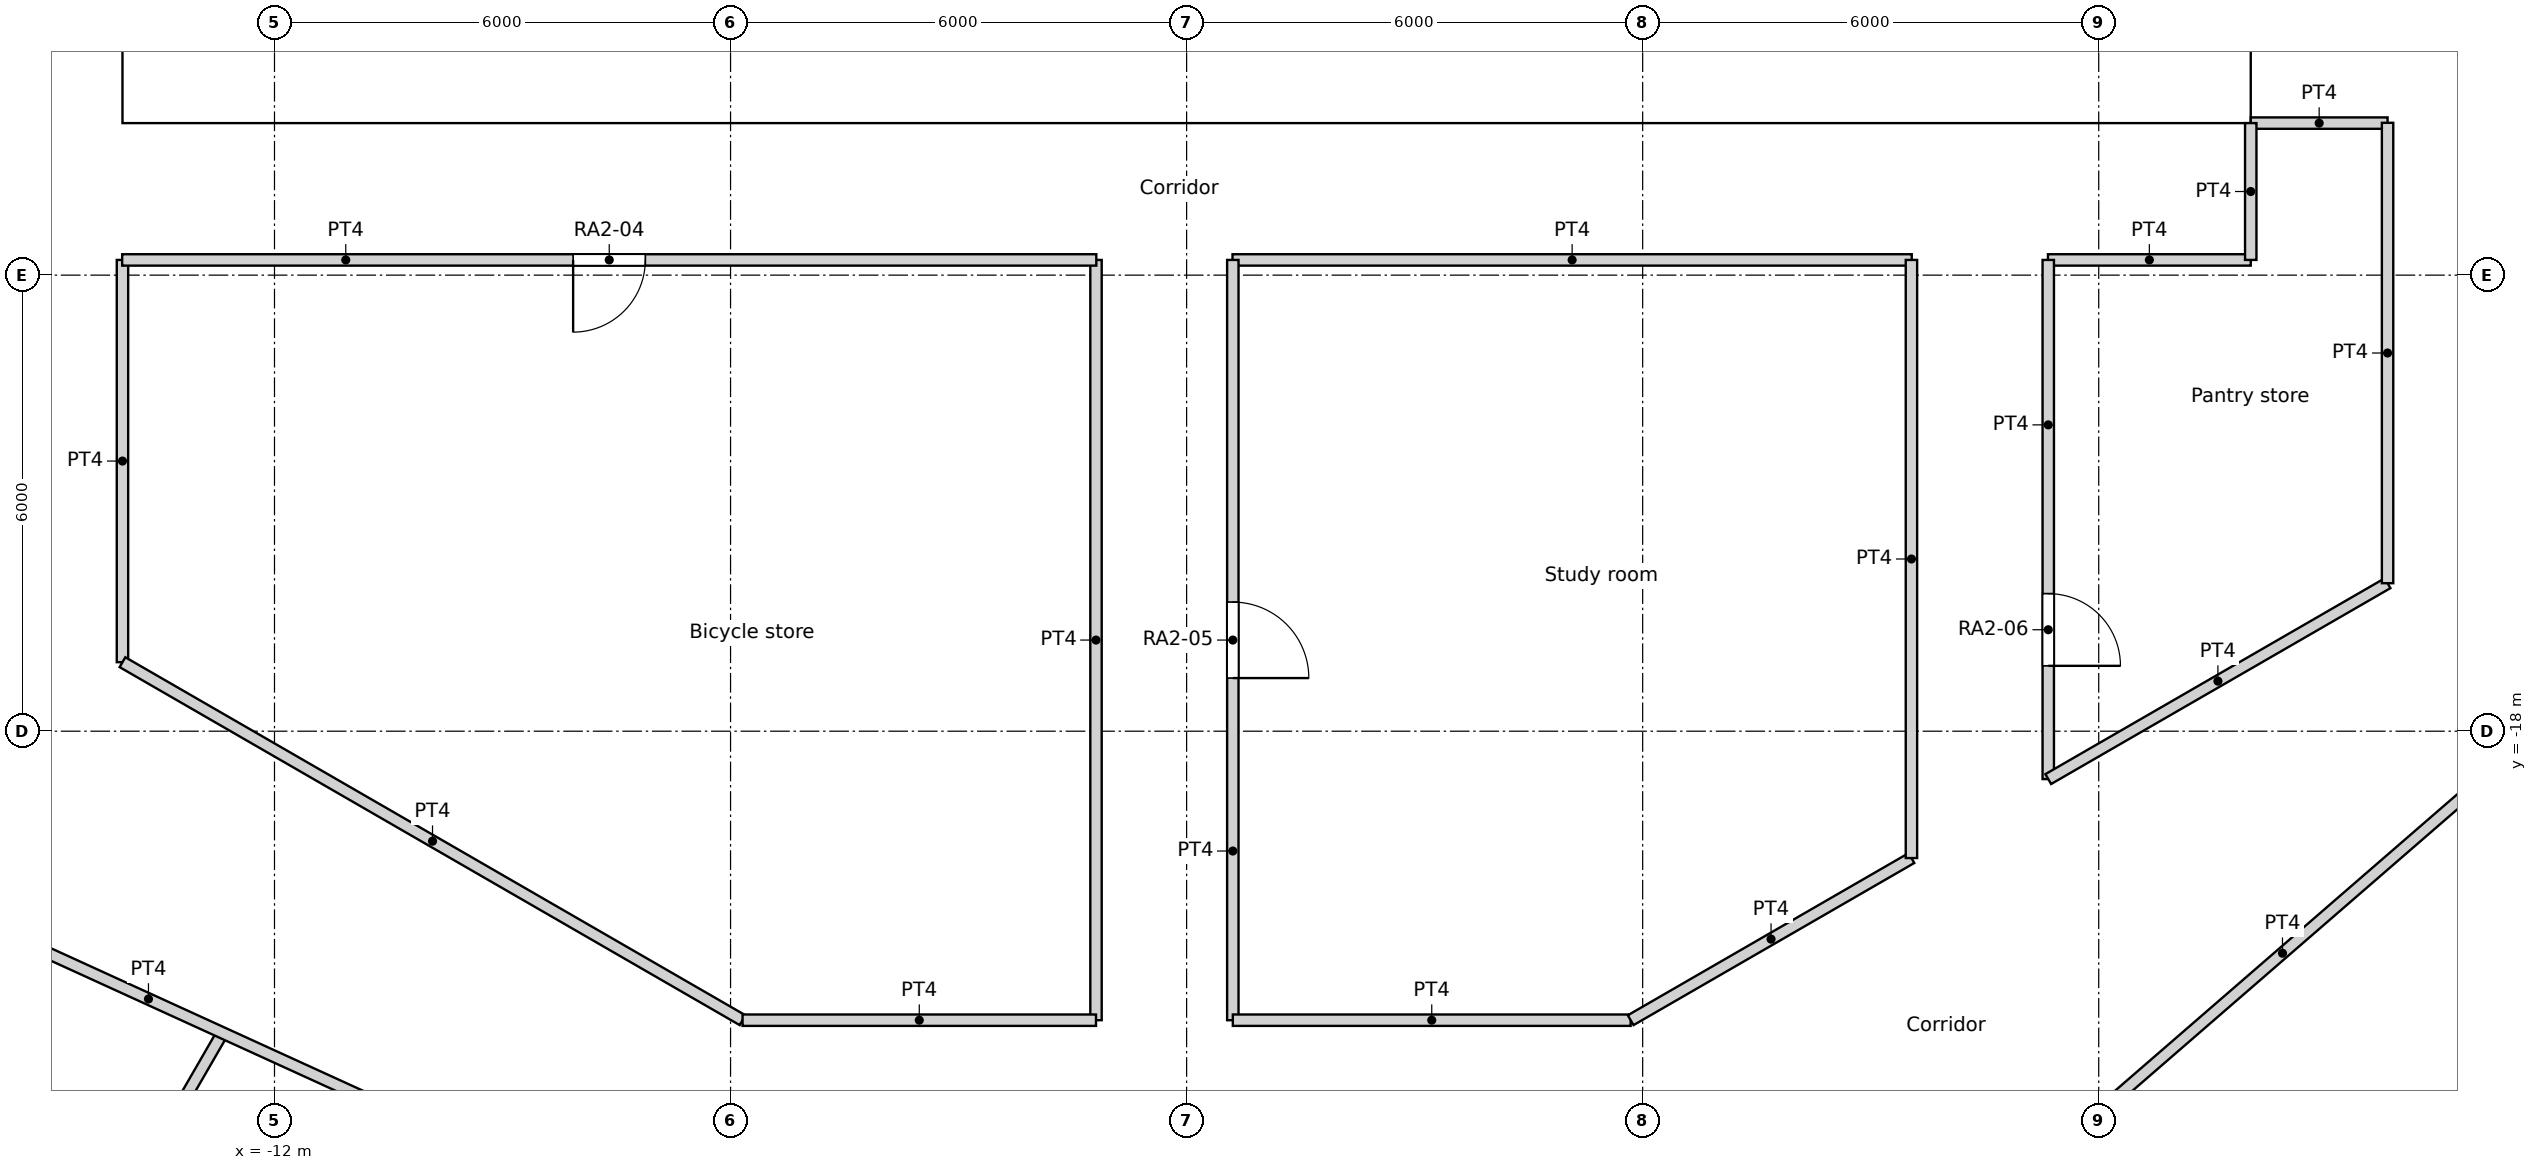
"""IFC4 building model, lengths in metres.
Left out: names, types, materials, properties, quantities, classifications, styles, units other than length and angle.
Written with IfcOpenShell. Run it as: python <this file> out.ifc"""

import sys

from ifc_helpers import new_model, si_unit, direction, frame, frame_2d, origin, origin_2d, place, context, subcontext, project, spatial, rectangle, circle, extrude, element, fill, save


model = new_model("IFC4")
c1 = context("Model", 3, precision=1e-05, world=origin(), true_north=direction((0.0, 1.0)))
c2 = subcontext(c1, "Body", "Model", "MODEL_VIEW")
j1 = project(units=[si_unit("LENGTHUNIT", "METRE"), si_unit("PLANEANGLEUNIT", "RADIAN")], contexts=[c1])
p1 = place(None, origin())
s1 = spatial("IfcSite", under=j1, at=p1, CompositionType="ELEMENT")
p2 = place(p1, origin())
s2 = spatial("IfcBuilding", under=s1, at=p2, CompositionType="ELEMENT")
p3 = place(p2, frame((0.0, 0.0, 39.0)))
s3 = spatial("IfcBuildingStorey", under=s2, at=p3, CompositionType="ELEMENT", Elevation=39.0)
for number, where, z_axis, x_axis in (
    (1, (-12.274, -21.259, 0.0), (0.0, 0.0, 1.0), (1.0, 0.0, 0.0)),
    (2, (9.723, -22.54, 0.0), (0.0, 0.0, 1.0), (1.0, 0.0, 0.0)),
    (3, (14.659, -19.69, 0.0), (0.0, 0.0, 1.0), (1.0, 0.0, 0.0)),
):
    element("IfcColumn", number, at=place(p3, frame(where, z_axis=z_axis, x_axis=x_axis)), inside=s3, PredefinedType="COLUMN", context=c2, shape_type="SweptSolid", body=[
        extrude(circle(Radius=0.75, at=origin_2d()), origin(), (0.0, 0.0, 1.0), 3.6),
    ])
for number, where, z_axis, x_axis in (
    (4, (-13.798, -12.802, 0.0), (0.0, 0.0, 1.0), (1.0, 0.0, 0.0)),
    (5, (-9.411, -16.301, 0.0), (0.0, 0.0, 1.0), (1.0, 0.0, 0.0)),
    (6, (-4.188, -18.35, 0.0), (0.0, 0.0, 1.0), (1.0, 0.0, 0.0)),
    (7, (1.406, -18.77, 0.0), (0.0, 0.0, 1.0), (1.0, 0.0, 0.0)),
    (8, (6.876, -17.521, 0.0), (0.0, 0.0, 1.0), (1.0, 0.0, 0.0)),
    (9, (11.735, -14.716, 0.0), (0.0, 0.0, 1.0), (1.0, 0.0, 0.0)),
    (10, (15.552, -10.603, 0.0), (0.0, 0.0, 1.0), (1.0, 0.0, 0.0)),
):
    element("IfcColumn", number, at=place(p3, frame(where, z_axis=z_axis, x_axis=x_axis)), inside=s3, PredefinedType="COLUMN", context=c2, shape_type="SweptSolid", body=[
        extrude(circle(Radius=0.8, at=origin_2d()), origin(), (0.0, 0.0, 1.0), 3.6),
    ])
p4 = place(p3, frame((-14.0, -9.4, 0.0), z_axis=(0.0, 0.0, 1.0), x_axis=(1.0, 0.0, 0.0)))
e11 = element("IfcWall", 11, at=p4, inside=s3, PredefinedType="SOLIDWALL", context=c2, shape_type="SweptSolid", body=[
    extrude(rectangle(XDim=28.0, YDim=1.2, at=frame_2d((14.0, 0.0))), origin(), (0.0, 0.0, 1.0), 3.6),
])
p5 = place(p4, frame((14.9, 0.0, 0.0)))
e12 = element("IfcOpeningElement", 12, at=p5, cuts=e11, PredefinedType="OPENING", context=c2, shape_type="SweptSolid", body=[
    extrude(rectangle(XDim=1.0, YDim=2.1, at=frame_2d((0.5, 1.05))), frame((0.0, 0.6, 0.0), z_axis=(0.0, -1.0, 0.0), x_axis=(1.0, 0.0, 0.0)), (0.0, 0.0, 1.0), 1.2),
])
p6 = place(p4, frame((9.8, 0.0, 0.0)))
e13 = element("IfcOpeningElement", 13, at=p6, cuts=e11, PredefinedType="OPENING", context=c2, shape_type="SweptSolid", body=[
    extrude(rectangle(XDim=1.8, YDim=2.1, at=frame_2d((0.9, 1.05))), frame((0.0, 0.6, 0.0), z_axis=(0.0, -1.0, 0.0), x_axis=(1.0, 0.0, 0.0)), (0.0, 0.0, 1.0), 1.2),
])
p7 = place(p4, frame((16.4, 0.0, 0.0)))
e14 = element("IfcOpeningElement", 14, at=p7, cuts=e11, PredefinedType="OPENING", context=c2, shape_type="SweptSolid", body=[
    extrude(rectangle(XDim=1.8, YDim=2.1, at=frame_2d((0.9, 1.05))), frame((0.0, 0.6, 0.0), z_axis=(0.0, -1.0, 0.0), x_axis=(1.0, 0.0, 0.0)), (0.0, 0.0, 1.0), 1.2),
])
p8 = place(p3, frame((-14.004, -11.8, 0.0), z_axis=(0.0, 0.0, 1.0), x_axis=(1.0, 0.0, 0.0)))
e15 = element("IfcWall", 15, at=p8, inside=s3, PredefinedType="PARTITIONING", context=c2, shape_type="SweptSolid", body=[
    extrude(rectangle(XDim=12.816, YDim=0.15, at=frame_2d((6.408, 0.0))), origin(), (0.0, 0.0, 1.0), 3.15),
])
p9 = place(p8, frame((5.933, 0.0, 0.0)))
e16 = element("IfcOpeningElement", 16, at=p9, cuts=e15, PredefinedType="OPENING", context=c2, shape_type="SweptSolid", body=[
    extrude(rectangle(XDim=0.95, YDim=2.1, at=frame_2d((0.475, 1.05))), frame((0.0, 0.075, 0.0), z_axis=(0.0, -1.0, 0.0), x_axis=(1.0, 0.0, 0.0)), (0.0, 0.0, 1.0), 0.15),
])
p10 = place(p3, frame((0.604, -11.8, 0.0), z_axis=(0.0, 0.0, 1.0), x_axis=(1.0, 0.0, 0.0)))
e17 = element("IfcWall", 17, at=p10, inside=s3, PredefinedType="PARTITIONING", context=c2, shape_type="SweptSolid", body=[
    extrude(rectangle(XDim=8.936, YDim=0.15, at=frame_2d((4.468, 0.0))), origin(), (0.0, 0.0, 1.0), 3.15),
])
p11 = place(p3, frame((14.0, -11.8, 0.0), z_axis=(0.0, 0.0, 1.0), x_axis=(0.0, 1.0, 0.0)))
e18 = element("IfcWall", 18, at=p11, inside=s3, PredefinedType="PARTITIONING", context=c2, shape_type="SweptSolid", body=[
    extrude(rectangle(XDim=1.8, YDim=0.15, at=frame_2d((0.9, 0.0))), origin(), (0.0, 0.0, 1.0), 3.15),
])
p12 = place(p3, frame((11.332, -11.8, 0.0), z_axis=(0.0, 0.0, 1.0), x_axis=(1.0, 0.0, 0.0)))
e19 = element("IfcWall", 19, at=p12, inside=s3, PredefinedType="PARTITIONING", context=c2, shape_type="SweptSolid", body=[
    extrude(rectangle(XDim=2.668, YDim=0.15, at=frame_2d((1.334, 0.0))), origin(), (0.0, 0.0, 1.0), 3.15),
])
p13 = place(p3, frame((14.0, -10.0, 0.0), z_axis=(0.0, 0.0, 1.0), x_axis=(1.0, 0.0, 0.0)))
e20 = element("IfcWall", 20, at=p13, inside=s3, PredefinedType="PARTITIONING", context=c2, shape_type="SweptSolid", body=[
    extrude(rectangle(XDim=1.8, YDim=0.15, at=frame_2d((0.9, 0.0))), origin(), (0.0, 0.0, 1.0), 3.15),
])
p14 = place(p3, frame((15.8, -16.053, 0.0), z_axis=(0.0, 0.0, 1.0), x_axis=(0.0, 1.0, 0.0)))
e21 = element("IfcWall", 21, at=p14, inside=s3, PredefinedType="PARTITIONING", context=c2, shape_type="SweptSolid", body=[
    extrude(rectangle(XDim=6.057, YDim=0.15, at=frame_2d((3.028, 0.0))), origin(), (0.0, 0.0, 1.0), 3.15),
])
p15 = place(p3, frame((-14.0, -17.092, 0.0), z_axis=(0.0, 0.0, 1.0), x_axis=(0.0, 1.0, 0.0)))
e22 = element("IfcWall", 22, at=p15, inside=s3, PredefinedType="PARTITIONING", context=c2, shape_type="SweptSolid", body=[
    extrude(rectangle(XDim=5.292, YDim=0.15, at=frame_2d((2.646, 0.0))), origin(), (0.0, 0.0, 1.0), 3.15),
])
p16 = place(p3, frame((-14.0, -17.092, 0.0), z_axis=(0.0, 0.0, 1.0), x_axis=(0.86602719091, -0.499996904595, 0.0)))
e23 = element("IfcWall", 23, at=p16, inside=s3, PredefinedType="PARTITIONING", context=c2, shape_type="SweptSolid", body=[
    extrude(rectangle(XDim=9.42, YDim=0.15, at=frame_2d((4.71, 0.0))), origin(), (0.0, 0.0, 1.0), 3.15),
])
p17 = place(p3, frame((-5.842, -21.802, 0.0), z_axis=(0.0, 0.0, 1.0), x_axis=(1.0, 0.0, 0.0)))
e24 = element("IfcWall", 24, at=p17, inside=s3, PredefinedType="PARTITIONING", context=c2, shape_type="SweptSolid", body=[
    extrude(rectangle(XDim=4.65, YDim=0.15, at=frame_2d((2.325, 0.0))), origin(), (0.0, 0.0, 1.0), 3.15),
])
p18 = place(p3, frame((-1.192, -21.802, 0.0), z_axis=(0.0, 0.0, 1.0), x_axis=(0.0, 1.0, 0.0)))
e25 = element("IfcWall", 25, at=p18, inside=s3, PredefinedType="PARTITIONING", context=c2, shape_type="SweptSolid", body=[
    extrude(rectangle(XDim=10.002, YDim=0.15, at=frame_2d((5.001, 0.0))), origin(), (0.0, 0.0, 1.0), 3.15),
])
p19 = place(p3, frame((0.608, -21.802, 0.0), z_axis=(0.0, 0.0, 1.0), x_axis=(0.0, 1.0, 0.0)))
e26 = element("IfcWall", 26, at=p19, inside=s3, PredefinedType="PARTITIONING", context=c2, shape_type="SweptSolid", body=[
    extrude(rectangle(XDim=10.002, YDim=0.15, at=frame_2d((5.001, 0.0))), origin(), (0.0, 0.0, 1.0), 3.15),
])
p20 = place(p19, frame((4.501, 0.0, 0.0)))
e27 = element("IfcOpeningElement", 27, at=p20, cuts=e26, PredefinedType="OPENING", context=c2, shape_type="SweptSolid", body=[
    extrude(rectangle(XDim=1.0, YDim=2.04, at=frame_2d((0.5, 1.02))), frame((0.0, 0.075, 0.0), z_axis=(0.0, -1.0, 0.0), x_axis=(1.0, 0.0, 0.0)), (0.0, 0.0, 1.0), 0.15),
])
p21 = place(p3, frame((0.608, -21.802, 0.0), z_axis=(0.0, 0.0, 1.0), x_axis=(1.0, 0.0, 0.0)))
e28 = element("IfcWall", 28, at=p21, inside=s3, PredefinedType="PARTITIONING", context=c2, shape_type="SweptSolid", body=[
    extrude(rectangle(XDim=5.234, YDim=0.15, at=frame_2d((2.617, 0.0))), origin(), (0.0, 0.0, 1.0), 3.15),
])
p22 = place(p3, frame((5.842, -21.802, 0.0), z_axis=(0.0, 0.0, 1.0), x_axis=(0.865983505205, 0.500072563448, 0.0)))
e29 = element("IfcWall", 29, at=p22, inside=s3, PredefinedType="PARTITIONING", context=c2, shape_type="SweptSolid", body=[
    extrude(rectangle(XDim=4.265, YDim=0.15, at=frame_2d((2.133, 0.0))), origin(), (0.0, 0.0, 1.0), 3.15),
])
p23 = place(p3, frame((9.536, -19.669, 0.0), z_axis=(0.0, 0.0, 1.0), x_axis=(0.0, 1.0, 0.0)))
e30 = element("IfcWall", 30, at=p23, inside=s3, PredefinedType="PARTITIONING", context=c2, shape_type="SweptSolid", body=[
    extrude(rectangle(XDim=7.869, YDim=0.15, at=frame_2d((3.935, 0.0))), origin(), (0.0, 0.0, 1.0), 3.15),
])
p24 = place(p3, frame((11.336, -18.63, 0.0), z_axis=(0.0, 0.0, 1.0), x_axis=(0.0, 1.0, 0.0)))
e31 = element("IfcWall", 31, at=p24, inside=s3, PredefinedType="PARTITIONING", context=c2, shape_type="SweptSolid", body=[
    extrude(rectangle(XDim=6.83, YDim=0.15, at=frame_2d((3.415, 0.0))), origin(), (0.0, 0.0, 1.0), 3.15),
])
p25 = place(p24, frame((1.49, 0.0, 0.0)))
e32 = element("IfcOpeningElement", 32, at=p25, cuts=e31, PredefinedType="OPENING", context=c2, shape_type="SweptSolid", body=[
    extrude(rectangle(XDim=0.95, YDim=2.1, at=frame_2d((0.475, 1.05))), frame((0.0, 0.075, 0.0), z_axis=(0.0, -1.0, 0.0), x_axis=(1.0, 0.0, 0.0)), (0.0, 0.0, 1.0), 0.15),
])
p26 = place(p3, frame((11.336, -18.63, 0.0), z_axis=(0.0, 0.0, 1.0), x_axis=(0.866063337164, 0.499934291702, 0.0)))
e33 = element("IfcWall", 33, at=p26, inside=s3, PredefinedType="PARTITIONING", context=c2, shape_type="SweptSolid", body=[
    extrude(rectangle(XDim=5.155, YDim=0.15, at=frame_2d((2.577, 0.0))), origin(), (0.0, 0.0, 1.0), 3.15),
])
p27 = place(p3, frame((-17.235, -19.89, 0.0), z_axis=(0.0, 0.0, 1.0), x_axis=(0.909645678785, -0.415385049163, 0.0)))
e34 = element("IfcWall", 34, at=p27, inside=s3, PredefinedType="PARTITIONING", context=c2, shape_type="SweptSolid", body=[
    extrude(rectangle(XDim=14.829, YDim=0.15, at=frame_2d((7.415, 0.0))), origin(), (0.0, 0.0, 1.0), 3.15),
])
p28 = place(p27, frame((7.914, 0.0, 0.0)))
e35 = element("IfcOpeningElement", 35, at=p28, cuts=e34, PredefinedType="OPENING", context=c2, shape_type="SweptSolid", body=[
    extrude(rectangle(XDim=1.8, YDim=2.1, at=frame_2d((0.9, 1.05))), frame((0.0, 0.075, 0.0), z_axis=(0.0, -1.0, 0.0), x_axis=(1.0, 0.0, 0.0)), (0.0, 0.0, 1.0), 0.15),
])
p29 = place(p3, frame((10.933, -23.94, 0.0), z_axis=(0.0, 0.0, 1.0), x_axis=(0.755793907002, 0.654809567843, 0.0)))
e36 = element("IfcWall", 36, at=p29, inside=s3, PredefinedType="PARTITIONING", context=c2, shape_type="SweptSolid", body=[
    extrude(rectangle(XDim=9.221, YDim=0.15, at=frame_2d((4.61, 0.0))), origin(), (0.0, 0.0, 1.0), 3.15),
])
p30 = place(p3, frame((-15.612, -27.041, 0.0), z_axis=(0.0, 0.0, 1.0), x_axis=(0.499954606878, 0.86605160993, 0.0)))
e37 = element("IfcWall", 37, at=p30, inside=s3, PredefinedType="PARTITIONING", context=c2, shape_type="SweptSolid", body=[
    extrude(rectangle(XDim=5.856, YDim=0.15, at=frame_2d((2.928, 0.0))), origin(), (0.0, 0.0, 1.0), 3.15),
])
p31 = place(p5, origin())
e38 = element("IfcDoor", 38, at=p31, inside=s3, OperationType="SINGLE_SWING_LEFT", PredefinedType="DOOR", context=c2, shape_type="SweptSolid", body=[
    extrude(rectangle(XDim=1.0, YDim=2.1, at=frame_2d((0.5, 1.05))), frame((0.0, 0.025, 0.0), z_axis=(0.0, -1.0, 0.0), x_axis=(1.0, 0.0, 0.0)), (0.0, 0.0, 1.0), 0.05),
])
fill(e12, e38)
p32 = place(p6, origin())
e39 = element("IfcDoor", 39, at=p32, inside=s3, OperationType="DOUBLE_DOOR_SINGLE_SWING", PredefinedType="DOOR", context=c2, shape_type="SweptSolid", body=[
    extrude(rectangle(XDim=1.8, YDim=2.1, at=frame_2d((0.9, 1.05))), frame((0.0, 0.025, 0.0), z_axis=(0.0, -1.0, 0.0), x_axis=(1.0, 0.0, 0.0)), (0.0, 0.0, 1.0), 0.05),
])
fill(e13, e39)
p33 = place(p7, origin())
e40 = element("IfcDoor", 40, at=p33, inside=s3, OperationType="DOUBLE_DOOR_SINGLE_SWING", PredefinedType="DOOR", context=c2, shape_type="SweptSolid", body=[
    extrude(rectangle(XDim=1.8, YDim=2.1, at=frame_2d((0.9, 1.05))), frame((0.0, 0.025, 0.0), z_axis=(0.0, -1.0, 0.0), x_axis=(1.0, 0.0, 0.0)), (0.0, 0.0, 1.0), 0.05),
])
fill(e14, e40)
p34 = place(p9, origin())
e41 = element("IfcDoor", 41, at=p34, inside=s3, OperationType="SINGLE_SWING_RIGHT", PredefinedType="DOOR", context=c2, shape_type="SweptSolid", body=[
    extrude(rectangle(XDim=0.95, YDim=2.1, at=frame_2d((0.475, 1.05))), frame((0.0, 0.025, 0.0), z_axis=(0.0, -1.0, 0.0), x_axis=(1.0, 0.0, 0.0)), (0.0, 0.0, 1.0), 0.05),
])
fill(e16, e41)
p35 = place(p20, origin())
e42 = element("IfcDoor", 42, at=p35, inside=s3, OperationType="SINGLE_SWING_RIGHT", PredefinedType="DOOR", context=c2, shape_type="SweptSolid", body=[
    extrude(rectangle(XDim=1.0, YDim=2.04, at=frame_2d((0.5, 1.02))), frame((0.0, 0.025, 0.0), z_axis=(0.0, -1.0, 0.0), x_axis=(1.0, 0.0, 0.0)), (0.0, 0.0, 1.0), 0.05),
])
fill(e27, e42)
p36 = place(p25, origin())
e43 = element("IfcDoor", 43, at=p36, inside=s3, OperationType="SINGLE_SWING_RIGHT", PredefinedType="DOOR", context=c2, shape_type="SweptSolid", body=[
    extrude(rectangle(XDim=0.95, YDim=2.1, at=frame_2d((0.475, 1.05))), frame((0.0, 0.025, 0.0), z_axis=(0.0, -1.0, 0.0), x_axis=(1.0, 0.0, 0.0)), (0.0, 0.0, 1.0), 0.05),
])
fill(e32, e43)
save(model, sys.argv[1])
